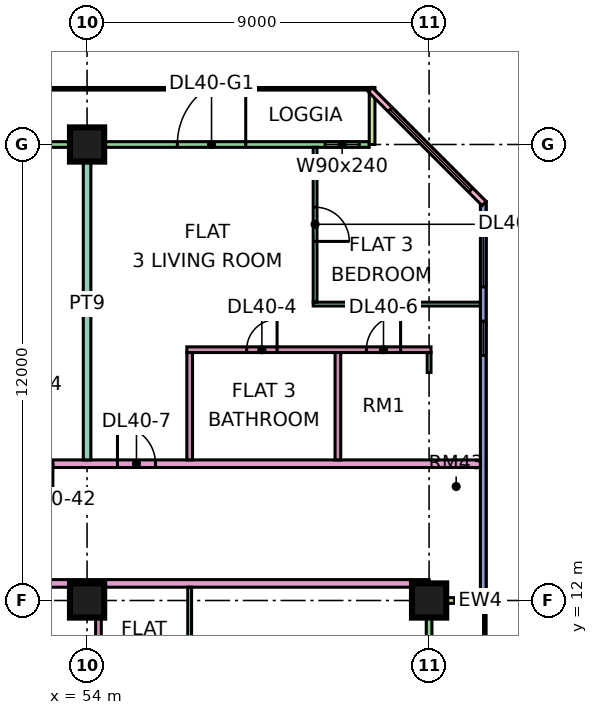
"""IFC4 building model, lengths in metres.
Left out: names, types, materials, properties, quantities, classifications, styles, units other than length and angle.
Written with IfcOpenShell. Run it as: python <this file> out.ifc"""

import sys

from ifc_helpers import new_model, si_unit, direction, frame, frame_2d, origin, origin_2d, place, context, subcontext, project, spatial, rectangle, extrude, element, fill, save


model = new_model("IFC4")
c1 = context("Model", 3, precision=1e-05, world=origin(), true_north=direction((0.0, 1.0)))
c2 = subcontext(c1, "Body", "Model", "MODEL_VIEW")
j1 = project(units=[si_unit("LENGTHUNIT", "METRE"), si_unit("PLANEANGLEUNIT", "RADIAN")], contexts=[c1])
p1 = place(None, origin())
s1 = spatial("IfcSite", under=j1, at=p1, CompositionType="ELEMENT")
p2 = place(p1, origin())
s2 = spatial("IfcBuilding", under=s1, at=p2, CompositionType="ELEMENT")
p3 = place(p2, frame((0.0, 0.0, 176.15)))
s3 = spatial("IfcBuildingStorey", under=s2, at=p3, CompositionType="ELEMENT", Elevation=176.15)
for number, where, z_axis, x_axis in (
    (1, (54.0, 12.0, 0.0), (0.0, 0.0, 1.0), (1.0, 0.0, 0.0)),
    (2, (54.0, 24.0, 0.0), (0.0, 0.0, 1.0), (1.0, 0.0, 0.0)),
    (3, (63.0, 12.0, 0.0), (0.0, 0.0, 1.0), (1.0, 0.0, 0.0)),
):
    element("IfcColumn", number, at=place(p3, frame(where, z_axis=z_axis, x_axis=x_axis)), inside=s3, PredefinedType="COLUMN", context=c2, shape_type="SweptSolid", body=[
        extrude(rectangle(XDim=0.9, YDim=0.9, at=origin_2d()), origin(), (0.0, 0.0, 1.0), 3.75),
    ])
p4 = place(p3, frame((61.425, 24.0, 0.0), z_axis=(0.0, 0.0, 1.0), x_axis=(-1.0, 0.0, 0.0)))
e4 = element("IfcWall", 4, at=p4, inside=s3, PredefinedType="SOLIDWALL", context=c2, shape_type="SweptSolid", body=[
    extrude(rectangle(XDim=13.35, YDim=0.15, at=frame_2d((6.675, 0.0))), origin(), (0.0, 0.0, 1.0), 3.35),
])
p5 = place(p4, frame((0.262, 0.0, 0.45)))
e5 = element("IfcOpeningElement", 5, at=p5, cuts=e4, PredefinedType="OPENING", context=c2, shape_type="SweptSolid", body=[
    extrude(rectangle(XDim=0.9, YDim=2.4, at=frame_2d((0.45, 1.2))), frame((0.0, 0.085, 0.0), z_axis=(0.0, -1.0, 0.0), x_axis=(1.0, 0.0, 0.0)), (0.0, 0.0, 1.0), 0.17),
])
p6 = place(p4, frame((3.25, 0.0, 0.0)))
e6 = element("IfcOpeningElement", 6, at=p6, cuts=e4, PredefinedType="OPENING", context=c2, shape_type="SweptSolid", body=[
    extrude(rectangle(XDim=1.8, YDim=2.4, at=frame_2d((0.9, 1.2))), frame((0.0, 0.085, 0.0), z_axis=(0.0, -1.0, 0.0), x_axis=(1.0, 0.0, 0.0)), (0.0, 0.0, 1.0), 0.17),
])
p7 = place(p4, frame((8.562, 0.0, 0.45)))
e7 = element("IfcOpeningElement", 7, at=p7, cuts=e4, PredefinedType="OPENING", context=c2, shape_type="SweptSolid", body=[
    extrude(rectangle(XDim=4.2, YDim=2.4, at=frame_2d((2.1, 1.2))), frame((0.0, 0.085, 0.0), z_axis=(0.0, -1.0, 0.0), x_axis=(1.0, 0.0, 0.0)), (0.0, 0.0, 1.0), 0.17),
])
p8 = place(p3, frame((61.5, 25.5, 0.0), z_axis=(0.0, 0.0, 1.0), x_axis=(0.0, -1.0, 0.0)))
e8 = element("IfcWall", 8, at=p8, inside=s3, PredefinedType="SOLIDWALL", context=c2, shape_type="SweptSolid", body=[
    extrude(rectangle(XDim=1.5, YDim=0.15, at=frame_2d((0.75, 0.0))), origin(), (0.0, 0.0, 1.0), 3.35),
])
p9 = place(p3, frame((63.0, 1.575, 0.0), z_axis=(0.0, 0.0, 1.0), x_axis=(0.0, 1.0, 0.0)))
e9 = element("IfcWall", 9, at=p9, inside=s3, PredefinedType="SOLIDWALL", context=c2, shape_type="SweptSolid", body=[
    extrude(rectangle(XDim=10.35, YDim=0.15, at=frame_2d((5.175, 0.0))), origin(), (0.0, 0.0, 1.0), 3.35),
])
p10 = place(p9, frame((2.137, 0.0, 0.0)))
e10 = element("IfcOpeningElement", 10, at=p10, cuts=e9, PredefinedType="OPENING", context=c2, shape_type="SweptSolid", body=[
    extrude(rectangle(XDim=1.8, YDim=2.4, at=frame_2d((0.9, 1.2))), frame((0.0, 0.085, 0.0), z_axis=(0.0, -1.0, 0.0), x_axis=(1.0, 0.0, 0.0)), (0.0, 0.0, 1.0), 0.17),
])
p11 = place(p9, frame((6.475, 0.0, 0.45)))
e11 = element("IfcOpeningElement", 11, at=p11, cuts=e9, PredefinedType="OPENING", context=c2, shape_type="SweptSolid", body=[
    extrude(rectangle(XDim=3.0, YDim=2.4, at=frame_2d((1.5, 1.2))), frame((0.0, 0.085, 0.0), z_axis=(0.0, -1.0, 0.0), x_axis=(1.0, 0.0, 0.0)), (0.0, 0.0, 1.0), 0.17),
])
p12 = place(p3, frame((64.5, 12.0, 0.0), z_axis=(0.0, 0.0, 1.0), x_axis=(-1.0, 0.0, 0.0)))
e12 = element("IfcWall", 12, at=p12, inside=s3, PredefinedType="SOLIDWALL", context=c2, shape_type="SweptSolid", body=[
    extrude(rectangle(XDim=1.5, YDim=0.15, at=frame_2d((0.75, 0.0))), origin(), (0.0, 0.0, 1.0), 3.35),
])
p13 = place(p3, frame((64.425, 12.075, 0.0), z_axis=(0.0, 0.0, 1.0), x_axis=(0.0, 1.0, 0.0)))
e13 = element("IfcWall", 13, at=p13, inside=s3, PredefinedType="SOLIDWALL", context=c2, shape_type="SweptSolid", body=[
    extrude(rectangle(XDim=10.425, YDim=0.15, at=frame_2d((5.212, 0.0))), origin(), (0.0, 0.0, 1.0), 3.35),
])
p14 = place(p13, frame((6.375, 0.0, 0.45)))
e14 = element("IfcOpeningElement", 14, at=p14, cuts=e13, PredefinedType="OPENING", context=c2, shape_type="SweptSolid", body=[
    extrude(rectangle(XDim=0.9, YDim=2.4, at=frame_2d((0.45, 1.2))), frame((0.0, 0.085, 0.0), z_axis=(0.0, -1.0, 0.0), x_axis=(1.0, 0.0, 0.0)), (0.0, 0.0, 1.0), 0.17),
])
p15 = place(p13, frame((8.175, 0.0, 0.45)))
e15 = element("IfcOpeningElement", 15, at=p15, cuts=e13, PredefinedType="OPENING", context=c2, shape_type="SweptSolid", body=[
    extrude(rectangle(XDim=1.8, YDim=2.4, at=frame_2d((0.9, 1.2))), frame((0.0, 0.085, 0.0), z_axis=(0.0, -1.0, 0.0), x_axis=(1.0, 0.0, 0.0)), (0.0, 0.0, 1.0), 0.17),
])
p16 = place(p3, frame((64.447, 22.447, 0.0), z_axis=(0.0, 0.0, 1.0), x_axis=(-0.707106781187, 0.707106781187, 0.0)))
e16 = element("IfcWall", 16, at=p16, inside=s3, PredefinedType="SOLIDWALL", context=c2, shape_type="SweptSolid", body=[
    extrude(rectangle(XDim=4.243, YDim=0.15, at=frame_2d((2.121, 0.0))), origin(), (0.0, 0.0, 1.0), 3.35),
])
p17 = place(p16, frame((0.498, 0.0, 0.45)))
e17 = element("IfcOpeningElement", 17, at=p17, cuts=e16, PredefinedType="OPENING", context=c2, shape_type="SweptSolid", body=[
    extrude(rectangle(XDim=3.0, YDim=2.4, at=frame_2d((1.5, 1.2))), frame((0.0, 0.085, 0.0), z_axis=(0.0, -1.0, 0.0), x_axis=(1.0, 0.0, 0.0)), (0.0, 0.0, 1.0), 0.17),
])
p18 = place(p3, frame((40.65, 12.45, 0.0), z_axis=(0.0, 0.0, 1.0), x_axis=(1.0, 0.0, 0.0)))
e18 = element("IfcWall", 18, at=p18, inside=s3, PredefinedType="PARTITIONING", context=c2, shape_type="SweptSolid", body=[
    extrude(rectangle(XDim=22.35, YDim=0.2, at=frame_2d((11.175, 0.0))), origin(), (0.0, 0.0, 1.0), 3.35),
])
p19 = place(p18, frame((8.25, 0.0, 0.0)))
e19 = element("IfcOpeningElement", 19, at=p19, cuts=e18, PredefinedType="OPENING", context=c2, shape_type="SweptSolid", body=[
    extrude(rectangle(XDim=1.0, YDim=2.1, at=frame_2d((0.5, 1.05))), frame((0.0, 0.11, 0.0), z_axis=(0.0, -1.0, 0.0), x_axis=(1.0, 0.0, 0.0)), (0.0, 0.0, 1.0), 0.22),
])
p20 = place(p18, frame((1.05, 0.0, 0.0)))
e20 = element("IfcOpeningElement", 20, at=p20, cuts=e18, PredefinedType="OPENING", context=c2, shape_type="SweptSolid", body=[
    extrude(rectangle(XDim=1.0, YDim=2.1, at=frame_2d((0.5, 1.05))), frame((0.0, 0.11, 0.0), z_axis=(0.0, -1.0, 0.0), x_axis=(1.0, 0.0, 0.0)), (0.0, 0.0, 1.0), 0.22),
])
p21 = place(p3, frame((51.225, 15.6, 0.0), z_axis=(0.0, 0.0, 1.0), x_axis=(1.0, 0.0, 0.0)))
e21 = element("IfcWall", 21, at=p21, inside=s3, PredefinedType="PARTITIONING", context=c2, shape_type="SweptSolid", body=[
    extrude(rectangle(XDim=13.125, YDim=0.2, at=frame_2d((6.562, 0.0))), origin(), (0.0, 0.0, 1.0), 3.35),
])
p22 = place(p21, frame((3.575, 0.0, 0.0)))
e22 = element("IfcOpeningElement", 22, at=p22, cuts=e21, PredefinedType="OPENING", context=c2, shape_type="SweptSolid", body=[
    extrude(rectangle(XDim=1.0, YDim=2.1, at=frame_2d((0.5, 1.05))), frame((0.0, 0.11, 0.0), z_axis=(0.0, -1.0, 0.0), x_axis=(1.0, 0.0, 0.0)), (0.0, 0.0, 1.0), 0.22),
])
p23 = place(p21, frame((0.875, 0.0, 0.0)))
e23 = element("IfcOpeningElement", 23, at=p23, cuts=e21, PredefinedType="OPENING", context=c2, shape_type="SweptSolid", body=[
    extrude(rectangle(XDim=1.0, YDim=2.1, at=frame_2d((0.5, 1.05))), frame((0.0, 0.11, 0.0), z_axis=(0.0, -1.0, 0.0), x_axis=(1.0, 0.0, 0.0)), (0.0, 0.0, 1.0), 0.22),
])
p24 = place(p3, frame((54.0, 15.7, 0.0), z_axis=(0.0, 0.0, 1.0), x_axis=(0.0, 1.0, 0.0)))
e24 = element("IfcWall", 24, at=p24, inside=s3, PredefinedType="PARTITIONING", context=c2, shape_type="SweptSolid", body=[
    extrude(rectangle(XDim=8.226, YDim=0.2, at=frame_2d((4.113, 0.0))), origin(), (0.0, 0.0, 1.0), 3.35),
])
p25 = place(p3, frame((54.3, 7.725, 0.0), z_axis=(0.0, 0.0, 1.0), x_axis=(0.0, 1.0, 0.0)))
e25 = element("IfcWall", 25, at=p25, inside=s3, PredefinedType="PARTITIONING", context=c2, shape_type="SweptSolid", body=[
    extrude(rectangle(XDim=4.625, YDim=0.15, at=frame_2d((2.312, 0.0))), origin(), (0.0, 0.0, 1.0), 3.35),
])
p26 = place(p3, frame((56.625, 18.6, 0.0), z_axis=(0.0, 0.0, 1.0), x_axis=(1.0, 0.0, 0.0)))
e26 = element("IfcWall", 26, at=p26, inside=s3, PredefinedType="PARTITIONING", context=c2, shape_type="SweptSolid", body=[
    extrude(rectangle(XDim=6.425, YDim=0.15, at=frame_2d((3.212, 0.0))), origin(), (0.0, 0.0, 1.0), 3.35),
])
p27 = place(p26, frame((1.575, 0.0, 0.0)))
e27 = element("IfcOpeningElement", 27, at=p27, cuts=e26, PredefinedType="OPENING", context=c2, shape_type="SweptSolid", body=[
    extrude(rectangle(XDim=0.8, YDim=2.1, at=frame_2d((0.4, 1.05))), frame((0.0, 0.085, 0.0), z_axis=(0.0, -1.0, 0.0), x_axis=(1.0, 0.0, 0.0)), (0.0, 0.0, 1.0), 0.17),
])
p28 = place(p26, frame((4.725, 0.0, 0.0)))
e28 = element("IfcOpeningElement", 28, at=p28, cuts=e26, PredefinedType="OPENING", context=c2, shape_type="SweptSolid", body=[
    extrude(rectangle(XDim=0.9, YDim=2.1, at=frame_2d((0.45, 1.05))), frame((0.0, 0.085, 0.0), z_axis=(0.0, -1.0, 0.0), x_axis=(1.0, 0.0, 0.0)), (0.0, 0.0, 1.0), 0.17),
])
p29 = place(p3, frame((56.7, 7.725, 0.0), z_axis=(0.0, 0.0, 1.0), x_axis=(0.0, 1.0, 0.0)))
e29 = element("IfcWall", 29, at=p29, inside=s3, PredefinedType="PARTITIONING", context=c2, shape_type="SweptSolid", body=[
    extrude(rectangle(XDim=4.625, YDim=0.1, at=frame_2d((2.312, 0.0))), origin(), (0.0, 0.0, 1.0), 3.35),
])
p30 = place(p3, frame((56.7, 15.7, 0.0), z_axis=(0.0, 0.0, 1.0), x_axis=(0.0, 1.0, 0.0)))
e30 = element("IfcWall", 30, at=p30, inside=s3, PredefinedType="PARTITIONING", context=c2, shape_type="SweptSolid", body=[
    extrude(rectangle(XDim=2.825, YDim=0.15, at=frame_2d((1.413, 0.0))), origin(), (0.0, 0.0, 1.0), 3.35),
])
p31 = place(p3, frame((59.95, 19.8, 0.0), z_axis=(0.0, 0.0, 1.0), x_axis=(1.0, 0.0, 0.0)))
e31 = element("IfcWall", 31, at=p31, inside=s3, PredefinedType="PARTITIONING", context=c2, shape_type="SweptSolid", body=[
    extrude(rectangle(XDim=4.401, YDim=0.1, at=frame_2d((2.201, 0.0))), origin(), (0.0, 0.0, 1.0), 3.35),
])
p32 = place(p3, frame((60.0, 19.85, 0.0), z_axis=(0.0, 0.0, 1.0), x_axis=(0.0, 1.0, 0.0)))
e32 = element("IfcWall", 32, at=p32, inside=s3, PredefinedType="PARTITIONING", context=c2, shape_type="SweptSolid", body=[
    extrude(rectangle(XDim=4.076, YDim=0.1, at=frame_2d((2.038, 0.0))), origin(), (0.0, 0.0, 1.0), 3.35),
])
p33 = place(p32, frame((1.6, 0.0, 0.0)))
e33 = element("IfcOpeningElement", 33, at=p33, cuts=e32, PredefinedType="OPENING", context=c2, shape_type="SweptSolid", body=[
    extrude(rectangle(XDim=0.9, YDim=2.1, at=frame_2d((0.45, 1.05))), frame((0.0, 0.06, 0.0), z_axis=(0.0, -1.0, 0.0), x_axis=(1.0, 0.0, 0.0)), (0.0, 0.0, 1.0), 0.12),
])
p34 = place(p3, frame((60.6, 15.7, 0.0), z_axis=(0.0, 0.0, 1.0), x_axis=(0.0, 1.0, 0.0)))
e34 = element("IfcWall", 34, at=p34, inside=s3, PredefinedType="PARTITIONING", context=c2, shape_type="SweptSolid", body=[
    extrude(rectangle(XDim=2.825, YDim=0.15, at=frame_2d((1.413, 0.0))), origin(), (0.0, 0.0, 1.0), 3.35),
])
p35 = place(p3, frame((63.0, 18.0, 0.0), z_axis=(0.0, 0.0, 1.0), x_axis=(0.0, 1.0, 0.0)))
e35 = element("IfcWall", 35, at=p35, inside=s3, PredefinedType="PARTITIONING", context=c2, shape_type="SweptSolid", body=[
    extrude(rectangle(XDim=0.525, YDim=0.1, at=frame_2d((0.262, 0.0))), origin(), (0.0, 0.0, 1.0), 3.35),
])
p36 = place(p5, origin())
e36 = element("IfcWindow", 36, at=p36, inside=s3, PartitioningType="SINGLE_PANEL", PredefinedType="WINDOW", context=c2, shape_type="SweptSolid", body=[
    extrude(rectangle(XDim=0.9, YDim=2.4, at=frame_2d((0.45, 1.2))), frame((0.0, 0.03, 0.0), z_axis=(0.0, -1.0, 0.0), x_axis=(1.0, 0.0, 0.0)), (0.0, 0.0, 1.0), 0.06),
])
fill(e5, e36)
p37 = place(p6, frame((1.8, 0.0, 0.0), z_axis=(0.0, 0.0, 1.0), x_axis=(-1.0, 0.0, 0.0)))
e37 = element("IfcDoor", 37, at=p37, inside=s3, OperationType="DOUBLE_DOOR_SINGLE_SWING", PredefinedType="DOOR", context=c2, shape_type="SweptSolid", body=[
    extrude(rectangle(XDim=1.8, YDim=2.4, at=frame_2d((0.9, 1.2))), frame((0.0, 0.025, 0.0), z_axis=(0.0, -1.0, 0.0), x_axis=(1.0, 0.0, 0.0)), (0.0, 0.0, 1.0), 0.05),
])
fill(e6, e37)
p38 = place(p14, origin())
e38 = element("IfcWindow", 38, at=p38, inside=s3, PartitioningType="SINGLE_PANEL", PredefinedType="WINDOW", context=c2, shape_type="SweptSolid", body=[
    extrude(rectangle(XDim=0.9, YDim=2.4, at=frame_2d((0.45, 1.2))), frame((0.0, 0.03, 0.0), z_axis=(0.0, -1.0, 0.0), x_axis=(1.0, 0.0, 0.0)), (0.0, 0.0, 1.0), 0.06),
])
fill(e14, e38)
p39 = place(p15, origin())
e39 = element("IfcWindow", 39, at=p39, inside=s3, PartitioningType="SINGLE_PANEL", PredefinedType="WINDOW", context=c2, shape_type="SweptSolid", body=[
    extrude(rectangle(XDim=1.8, YDim=2.4, at=frame_2d((0.9, 1.2))), frame((0.0, 0.03, 0.0), z_axis=(0.0, -1.0, 0.0), x_axis=(1.0, 0.0, 0.0)), (0.0, 0.0, 1.0), 0.06),
])
fill(e15, e39)
p40 = place(p17, origin())
e40 = element("IfcWindow", 40, at=p40, inside=s3, PartitioningType="SINGLE_PANEL", PredefinedType="WINDOW", context=c2, shape_type="SweptSolid", body=[
    extrude(rectangle(XDim=3.0, YDim=2.4, at=frame_2d((1.5, 1.2))), frame((0.0, 0.03, 0.0), z_axis=(0.0, -1.0, 0.0), x_axis=(1.0, 0.0, 0.0)), (0.0, 0.0, 1.0), 0.06),
])
fill(e17, e40)
p41 = place(p27, frame((0.8, 0.0, 0.0), z_axis=(0.0, 0.0, 1.0), x_axis=(-1.0, 0.0, 0.0)))
e41 = element("IfcDoor", 41, at=p41, inside=s3, OperationType="SINGLE_SWING_RIGHT", PredefinedType="DOOR", context=c2, shape_type="SweptSolid", body=[
    extrude(rectangle(XDim=0.8, YDim=2.1, at=frame_2d((0.4, 1.05))), frame((0.0, 0.025, 0.0), z_axis=(0.0, -1.0, 0.0), x_axis=(1.0, 0.0, 0.0)), (0.0, 0.0, 1.0), 0.05),
])
fill(e27, e41)
p42 = place(p33, frame((0.9, 0.0, 0.0), z_axis=(0.0, 0.0, 1.0), x_axis=(-1.0, 0.0, 0.0)))
e42 = element("IfcDoor", 42, at=p42, inside=s3, OperationType="SINGLE_SWING_LEFT", PredefinedType="DOOR", context=c2, shape_type="SweptSolid", body=[
    extrude(rectangle(XDim=0.9, YDim=2.1, at=frame_2d((0.45, 1.05))), frame((0.0, 0.025, 0.0), z_axis=(0.0, -1.0, 0.0), x_axis=(1.0, 0.0, 0.0)), (0.0, 0.0, 1.0), 0.05),
])
fill(e33, e42)
p43 = place(p28, frame((0.9, 0.0, 0.0), z_axis=(0.0, 0.0, 1.0), x_axis=(-1.0, 0.0, 0.0)))
e43 = element("IfcDoor", 43, at=p43, inside=s3, OperationType="SINGLE_SWING_RIGHT", PredefinedType="DOOR", context=c2, shape_type="SweptSolid", body=[
    extrude(rectangle(XDim=0.9, YDim=2.1, at=frame_2d((0.45, 1.05))), frame((0.0, 0.025, 0.0), z_axis=(0.0, -1.0, 0.0), x_axis=(1.0, 0.0, 0.0)), (0.0, 0.0, 1.0), 0.05),
])
fill(e28, e43)
p44 = place(p22, origin())
e44 = element("IfcDoor", 44, at=p44, inside=s3, OperationType="SINGLE_SWING_LEFT", PredefinedType="DOOR", context=c2, shape_type="SweptSolid", body=[
    extrude(rectangle(XDim=1.0, YDim=2.1, at=frame_2d((0.5, 1.05))), frame((0.0, 0.025, 0.0), z_axis=(0.0, -1.0, 0.0), x_axis=(1.0, 0.0, 0.0)), (0.0, 0.0, 1.0), 0.05),
])
fill(e22, e44)
p45 = place(p23, origin())
e45 = element("IfcDoor", 45, at=p45, inside=s3, OperationType="SINGLE_SWING_RIGHT", PredefinedType="DOOR", context=c2, shape_type="SweptSolid", body=[
    extrude(rectangle(XDim=1.0, YDim=2.1, at=frame_2d((0.5, 1.05))), frame((0.0, 0.025, 0.0), z_axis=(0.0, -1.0, 0.0), x_axis=(1.0, 0.0, 0.0)), (0.0, 0.0, 1.0), 0.05),
])
fill(e23, e45)
save(model, sys.argv[1])
